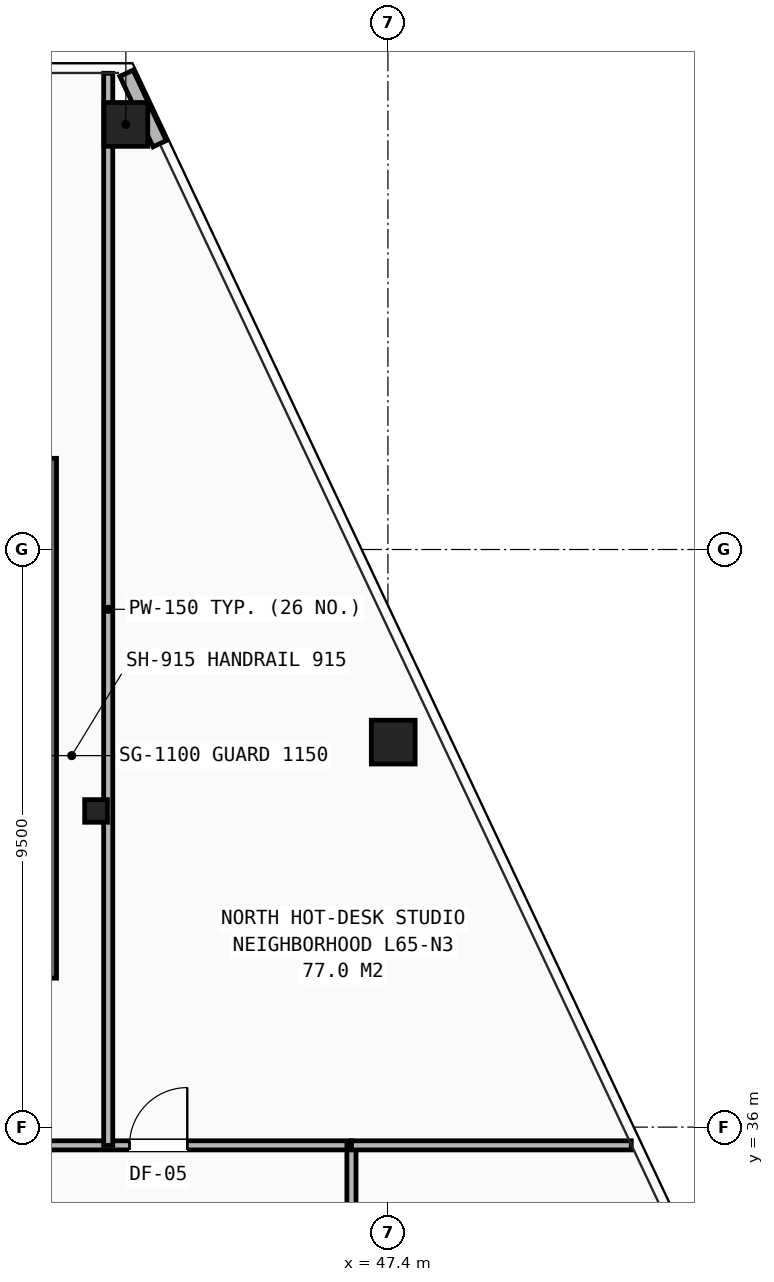
"""IFC4 building model, lengths in metres.
Left out: names, types, materials, properties, quantities, classifications, styles, units other than length and angle.
Written with IfcOpenShell. Run it as: python <this file> out.ifc"""

import sys

from ifc_helpers import new_model, si_unit, direction, frame, frame_2d, origin, origin_2d, place, context, subcontext, project, spatial, rectangle, hollow_rectangle, i_section, extrude, element, fill, save


model = new_model("IFC4")
c1 = context("Model", 3, precision=1e-05, world=origin(), true_north=direction((0.0, 1.0)))
c2 = subcontext(c1, "Body", "Model", "MODEL_VIEW")
j1 = project(units=[si_unit("LENGTHUNIT", "METRE"), si_unit("PLANEANGLEUNIT", "RADIAN")], contexts=[c1])
p1 = place(None, origin())
s1 = spatial("IfcSite", under=j1, at=p1, CompositionType="ELEMENT")
p2 = place(p1, origin())
s2 = spatial("IfcBuilding", under=s1, at=p2, CompositionType="ELEMENT")
p3 = place(p2, frame((0.0, 0.0, 229.4)))
s3 = spatial("IfcBuildingStorey", under=s2, at=p3, CompositionType="ELEMENT", Elevation=229.4)
p4 = place(p3, frame((42.6, 41.2, 0.0), z_axis=(0.0, 0.0, 1.0), x_axis=(1.0, 0.0, 0.0)))
e1 = element("IfcColumn", 1, at=p4, inside=s3, PredefinedType="COLUMN", context=c2, shape_type="SweptSolid", body=[
    extrude(i_section(OverallWidth=0.374, OverallDepth=0.372, WebThickness=0.016, FlangeThickness=0.026, at=origin_2d()), origin(), (0.0, 0.0, 1.0), 3.5),
])
for number, where, z_axis, x_axis in (
    (2, (43.09, 52.491, 0.0), (0.0, 0.0, 1.0), (1.0, 0.0, 0.0)),
    (3, (47.487, 42.332, 0.0), (0.0, 0.0, 1.0), (1.0, 0.0, 0.0)),
):
    element("IfcColumn", number, at=place(p3, frame(where, z_axis=z_axis, x_axis=x_axis)), inside=s3, PredefinedType="COLUMN", context=c2, shape_type="SweptSolid", body=[
        extrude(hollow_rectangle(XDim=0.72, YDim=0.72, WallThickness=0.05, at=origin_2d()), origin(), (0.0, 0.0, 1.0), 3.5),
    ])
p5 = place(p3, frame((43.646, 52.174, 0.0), z_axis=(0.0, 0.0, 1.0), x_axis=(-0.426209891413, 0.904624302383, 0.0)))
e4 = element("IfcWall", 4, at=p5, inside=s3, PredefinedType="SHEAR", context=c2, shape_type="SweptSolid", body=[
    extrude(rectangle(XDim=1.281, YDim=0.24, at=frame_2d((0.641, 0.0))), origin(), (0.0, 0.0, 1.0), 2.623),
])
p6 = place(p3, frame((40.75, 35.7, 0.0), z_axis=(0.0, 0.0, 1.0), x_axis=(1.0, 0.0, 0.0)))
e5 = element("IfcWall", 5, at=p6, inside=s3, PredefinedType="PARTITIONING", context=c2, shape_type="SweptSolid", body=[
    extrude(rectangle(XDim=6.05, YDim=0.15, at=frame_2d((3.025, 0.0))), origin(), (0.0, 0.0, 1.0), 3.25),
])
p7 = place(p6, frame((2.4, 0.0, 0.0)))
e6 = element("IfcOpeningElement", 6, at=p7, cuts=e5, PredefinedType="OPENING", context=c2, shape_type="SweptSolid", body=[
    extrude(rectangle(XDim=0.95, YDim=2.1, at=frame_2d((0.475, 1.05))), frame((0.0, 0.085, 0.0), z_axis=(0.0, -1.0, 0.0), x_axis=(1.0, 0.0, 0.0)), (0.0, 0.0, 1.0), 0.17),
])
p8 = place(p3, frame((46.8, 31.2, 0.0), z_axis=(0.0, 0.0, 1.0), x_axis=(0.0, 1.0, 0.0)))
e7 = element("IfcWall", 7, at=p8, inside=s3, PredefinedType="PARTITIONING", context=c2, shape_type="SweptSolid", body=[
    extrude(rectangle(XDim=4.5, YDim=0.15, at=frame_2d((2.25, 0.0))), origin(), (0.0, 0.0, 1.0), 2.978),
])
p9 = place(p3, frame((46.8, 35.7, 0.0), z_axis=(0.0, 0.0, 1.0), x_axis=(1.0, 0.0, 0.0)))
e8 = element("IfcWall", 8, at=p9, inside=s3, PredefinedType="PARTITIONING", context=c2, shape_type="SweptSolid", body=[
    extrude(rectangle(XDim=4.602, YDim=0.15, at=frame_2d((2.301, 0.0))), origin(), (0.0, 0.0, 1.0), 2.628),
])
p10 = place(p3, frame((42.8, 35.7, 0.0), z_axis=(0.0, 0.0, 1.0), x_axis=(0.0, 1.0, 0.0)))
e9 = element("IfcWall", 9, at=p10, inside=s3, PredefinedType="PARTITIONING", context=c2, shape_type="SweptSolid", body=[
    extrude(rectangle(XDim=17.633, YDim=0.15, at=frame_2d((8.816, 0.0))), origin(), (0.0, 0.0, 1.0), 2.292),
])
p11 = place(p3, frame((41.825, 38.45, 0.0), z_axis=(0.0, 0.0, 1.0), x_axis=(0.0, 1.0, 0.0)))
e10 = element("IfcWall", 10, at=p11, inside=s3, PredefinedType="SHEAR", context=c2, shape_type="SweptSolid", body=[
    extrude(rectangle(XDim=8.55, YDim=0.25, at=frame_2d((4.275, 0.0))), origin(), (0.0, 0.0, 1.0), 3.25),
])
p12 = place(p7, origin())
e11 = element("IfcDoor", 11, at=p12, inside=s3, OperationType="SINGLE_SWING_RIGHT", PredefinedType="DOOR", context=c2, shape_type="SweptSolid", body=[
    extrude(rectangle(XDim=0.95, YDim=2.1, at=frame_2d((0.475, 1.05))), frame((0.0, 0.025, 0.0), z_axis=(0.0, -1.0, 0.0), x_axis=(1.0, 0.0, 0.0)), (0.0, 0.0, 1.0), 0.05),
])
fill(e6, e11)
save(model, sys.argv[1])
